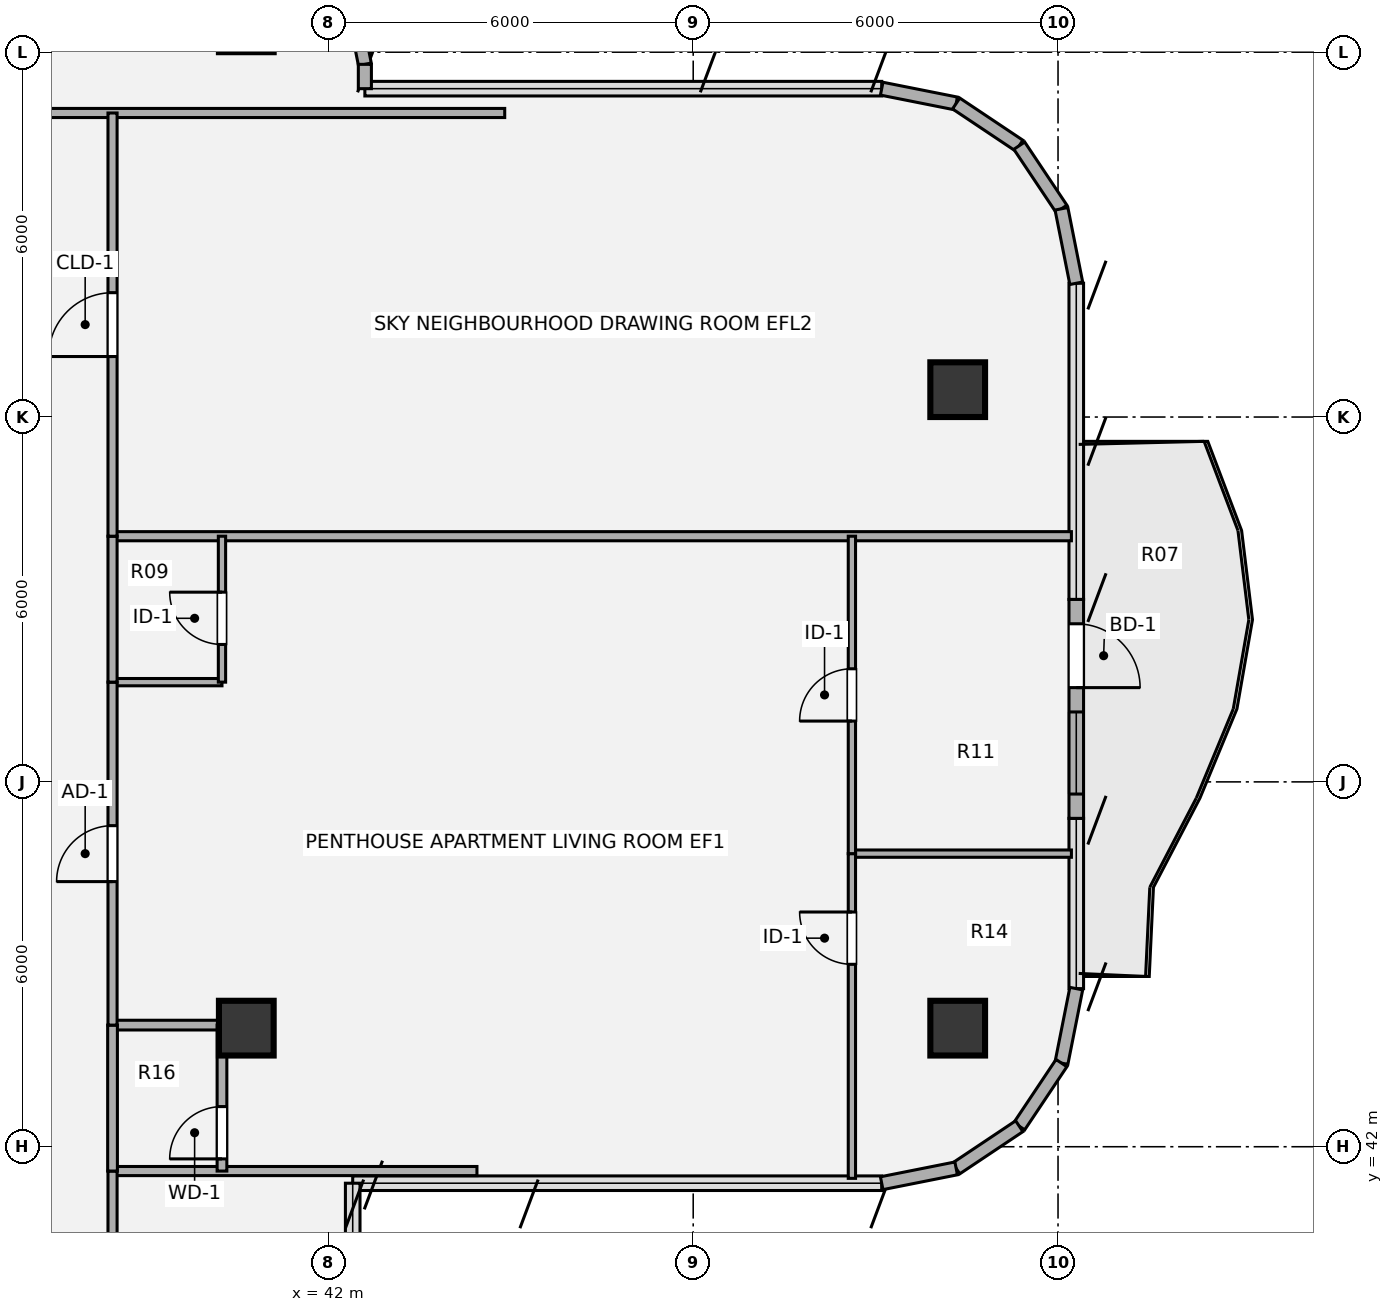
"""IFC4 building model, lengths in metres.
Left out: names, types, materials, properties, quantities, classifications, styles, units other than length and angle.
Written with IfcOpenShell. Run it as: python <this file> out.ifc"""

import sys

from ifc_helpers import new_model, si_unit, direction, frame, frame_2d, origin, origin_2d, place, context, subcontext, project, spatial, rectangle, hollow_circle, extrude, source, transform, mapped, element, fill, save


model = new_model("IFC4")
c1 = context("Model", 3, precision=1e-05, world=origin(), true_north=direction((0.0, 1.0)))
c2 = subcontext(c1, "Body", "Model", "MODEL_VIEW")
j1 = project(units=[si_unit("LENGTHUNIT", "METRE"), si_unit("PLANEANGLEUNIT", "RADIAN")], contexts=[c1])
p1 = place(None, origin())
s1 = spatial("IfcSite", under=j1, at=p1, CompositionType="ELEMENT")
p2 = place(p1, origin())
s2 = spatial("IfcBuilding", under=s1, at=p2, CompositionType="ELEMENT")
p3 = place(p2, frame((0.0, 0.0, 272.16)))
s3 = spatial("IfcBuildingStorey", under=s2, at=p3, CompositionType="ELEMENT", Elevation=272.16)
m1 = source(origin(), c2, "Body", "SweptSolid", [
    extrude(hollow_circle(Radius=0.45, WallThickness=0.032, at=origin_2d()), origin(), (0.0, 0.0, 1.0), 3.78),
])
for number, where, z_axis, x_axis in (
    (1, (52.35, 43.95, 0.0), (0.0, 0.0, 1.0), (1.0, 0.0, 0.0)),
    (2, (52.35, 54.45, 0.0), (0.0, 0.0, 1.0), (1.0, 0.0, 0.0)),
    (3, (40.65, 43.95, 0.0), (0.0, 0.0, 1.0), (1.0, 0.0, 0.0)),
):
    element("IfcColumn", number, at=place(p3, frame(where, z_axis=z_axis, x_axis=x_axis)), inside=s3, PredefinedType="COLUMN", context=c2, shape_type="MappedRepresentation", body=[
        mapped(m1, transform((0.0, 0.0, 0.0), x_axis=(1.0, 0.0, 0.0), y_axis=(0.0, 1.0, 0.0), z_axis=(0.0, 0.0, 1.0), scale=1.0)),
    ])
p4 = place(p3, frame((42.402, 60.795, 0.0), z_axis=(0.0, 0.0, 1.0), x_axis=(0.195190360752, -0.980765376158, 0.0)))
e4 = element("IfcWall", 4, at=p4, inside=s3, PredefinedType="SOLIDWALL", context=c2, shape_type="SweptSolid", body=[
    extrude(rectangle(XDim=1.014, YDim=0.215, at=frame_2d((0.507, 0.0))), origin(), (0.0, 0.0, 1.0), 3.53),
])
p5 = place(p3, frame((42.6, 59.8, 0.0), z_axis=(0.0, 0.0, 1.0), x_axis=(0.0, -1.0, 0.0)))
e5 = element("IfcWall", 5, at=p5, inside=s3, PredefinedType="SOLIDWALL", context=c2, shape_type="SweptSolid", body=[
    extrude(rectangle(XDim=0.4, YDim=0.215, at=frame_2d((0.2, 0.0))), origin(), (0.0, 0.0, 1.0), 3.53),
])
for number, where, z_axis, x_axis in (
    (6, (51.1, 59.4, 0.0), (0.0, 0.0, 1.0), (0.981, -0.195, 0.0)),
    (7, (52.325, 59.156, 0.0), (0.0, 0.0, 1.0), (0.831, -0.556, 0.0)),
    (8, (53.363, 58.463, 0.0), (0.0, 0.0, 1.0), (0.556, -0.831, 0.0)),
    (9, (54.056, 57.425, 0.0), (0.0, 0.0, 1.0), (0.195, -0.981, 0.0)),
):
    element("IfcWall", number, at=place(p3, frame(where, z_axis=z_axis, x_axis=x_axis)), inside=s3, PredefinedType="SOLIDWALL", context=c2, shape_type="SweptSolid", body=[
        extrude(rectangle(XDim=1.249, YDim=0.215, at=frame_2d((0.624, 0.0))), origin(), (0.0, 0.0, 1.0), 3.53),
    ])
p6 = place(p3, frame((54.3, 51.0, 0.0), z_axis=(0.0, 0.0, 1.0), x_axis=(0.0, -1.0, 0.0)))
e10 = element("IfcWall", 10, at=p6, inside=s3, PredefinedType="SOLIDWALL", context=c2, shape_type="SweptSolid", body=[
    extrude(rectangle(XDim=3.6, YDim=0.24, at=frame_2d((1.8, 0.0))), origin(), (0.0, 0.0, 1.0), 3.53),
])
p7 = place(p6, frame((0.4, 0.0, 0.0)))
e11 = element("IfcOpeningElement", 11, at=p7, cuts=e10, PredefinedType="OPENING", context=c2, shape_type="SweptSolid", body=[
    extrude(rectangle(XDim=1.05, YDim=2.15, at=origin_2d()), frame((0.525, 0.13, 1.075), z_axis=(0.0, -1.0, 0.0), x_axis=(1.0, 0.0, 0.0)), (0.0, 0.0, 1.0), 0.26),
])
p8 = place(p6, frame((1.85, 0.0, 0.85)))
e12 = element("IfcOpeningElement", 12, at=p8, cuts=e10, PredefinedType="OPENING", context=c2, shape_type="SweptSolid", body=[
    extrude(rectangle(XDim=1.35, YDim=1.35, at=origin_2d()), frame((0.675, 0.13, 0.675), z_axis=(0.0, -1.0, 0.0), x_axis=(1.0, 0.0, 0.0)), (0.0, 0.0, 1.0), 0.26),
])
for number, where, z_axis, x_axis in (
    (13, (54.3, 44.6, 0.0), (0.0, 0.0, 1.0), (-0.195, -0.981, 0.0)),
    (14, (54.056, 43.375, 0.0), (0.0, 0.0, 1.0), (-0.556, -0.831, 0.0)),
    (15, (53.363, 42.337, 0.0), (0.0, 0.0, 1.0), (-0.831, -0.556, 0.0)),
    (16, (52.325, 41.644, 0.0), (0.0, 0.0, 1.0), (-0.981, -0.195, 0.0)),
):
    element("IfcWall", number, at=place(p3, frame(where, z_axis=z_axis, x_axis=x_axis)), inside=s3, PredefinedType="SOLIDWALL", context=c2, shape_type="SweptSolid", body=[
        extrude(rectangle(XDim=1.249, YDim=0.215, at=frame_2d((0.624, 0.0))), origin(), (0.0, 0.0, 1.0), 3.53),
    ])
p9 = place(p3, frame((38.45, 41.6, 0.0), z_axis=(0.0, 0.0, 1.0), x_axis=(1.0, 0.0, 0.0)))
e17 = element("IfcWall", 17, at=p9, inside=s3, PredefinedType="PARTITIONING", context=c2, shape_type="SweptSolid", body=[
    extrude(rectangle(XDim=5.993, YDim=0.15, at=frame_2d((2.997, 0.0))), origin(), (0.0, 0.0, 1.0), 3.5),
])
p10 = place(p3, frame((38.45, 44.0, 0.0), z_axis=(0.0, 0.0, 1.0), x_axis=(1.0, 0.0, 0.0)))
e18 = element("IfcWall", 18, at=p10, inside=s3, PredefinedType="PLUMBINGWALL", context=c2, shape_type="SweptSolid", body=[
    extrude(rectangle(XDim=1.8, YDim=0.16, at=frame_2d((0.9, 0.0))), origin(), (0.0, 0.0, 1.0), 2.903),
])
p11 = place(p3, frame((50.61, 46.82, 0.0), z_axis=(0.0, 0.0, 1.0), x_axis=(1.0, 0.0, 0.0)))
e19 = element("IfcWall", 19, at=p11, inside=s3, PredefinedType="PARTITIONING", context=c2, shape_type="SweptSolid", body=[
    extrude(rectangle(XDim=3.61, YDim=0.12, at=frame_2d((1.805, 0.0))), origin(), (0.0, 0.0, 1.0), 2.982),
])
p12 = place(p3, frame((38.45, 49.64, 0.0), z_axis=(0.0, 0.0, 1.0), x_axis=(1.0, 0.0, 0.0)))
e20 = element("IfcWall", 20, at=p12, inside=s3, PredefinedType="PARTITIONING", context=c2, shape_type="SweptSolid", body=[
    extrude(rectangle(XDim=1.8, YDim=0.12, at=frame_2d((0.9, 0.0))), origin(), (0.0, 0.0, 1.0), 3.259),
])
p13 = place(p3, frame((38.45, 52.04, 0.0), z_axis=(0.0, 0.0, 1.0), x_axis=(1.0, 0.0, 0.0)))
e21 = element("IfcWall", 21, at=p13, inside=s3, PredefinedType="PARTITIONING", context=c2, shape_type="SweptSolid", body=[
    extrude(rectangle(XDim=15.77, YDim=0.15, at=frame_2d((7.885, 0.0))), origin(), (0.0, 0.0, 1.0), 2.982),
])
p14 = place(p3, frame((27.1, 59.0, 0.0), z_axis=(0.0, 0.0, 1.0), x_axis=(1.0, 0.0, 0.0)))
e22 = element("IfcWall", 22, at=p14, inside=s3, PredefinedType="PARTITIONING", context=c2, shape_type="SweptSolid", body=[
    extrude(rectangle(XDim=17.8, YDim=0.15, at=frame_2d((8.9, 0.0))), origin(), (0.0, 0.0, 1.0), 3.308),
])
p15 = place(p14, frame((8.375, 0.0, 0.0)))
e23 = element("IfcOpeningElement", 23, at=p15, cuts=e22, PredefinedType="OPENING", context=c2, shape_type="SweptSolid", body=[
    extrude(rectangle(XDim=1.05, YDim=2.1, at=origin_2d()), frame((0.525, 0.085, 1.05), z_axis=(0.0, -1.0, 0.0), x_axis=(1.0, 0.0, 0.0)), (0.0, 0.0, 1.0), 0.17),
])
p16 = place(p3, frame((38.45, 21.2, 0.0), z_axis=(0.0, 0.0, 1.0), x_axis=(0.0, 1.0, 0.0)))
e24 = element("IfcWall", 24, at=p16, inside=s3, PredefinedType="PARTITIONING", context=c2, shape_type="SweptSolid", body=[
    extrude(rectangle(XDim=20.4, YDim=0.15, at=frame_2d((10.2, 0.0))), origin(), (0.0, 0.0, 1.0), 3.5),
])
p17 = place(p16, frame((9.575, 0.0, 0.0)))
e25 = element("IfcOpeningElement", 25, at=p17, cuts=e24, PredefinedType="OPENING", context=c2, shape_type="SweptSolid", body=[
    extrude(rectangle(XDim=1.05, YDim=2.1, at=origin_2d()), frame((0.525, 0.085, 1.05), z_axis=(0.0, -1.0, 0.0), x_axis=(1.0, 0.0, 0.0)), (0.0, 0.0, 1.0), 0.17),
])
p18 = place(p3, frame((38.45, 41.6, 0.0), z_axis=(0.0, 0.0, 1.0), x_axis=(0.0, 1.0, 0.0)))
e26 = element("IfcWall", 26, at=p18, inside=s3, PredefinedType="PLUMBINGWALL", context=c2, shape_type="SweptSolid", body=[
    extrude(rectangle(XDim=2.4, YDim=0.16, at=frame_2d((1.2, 0.0))), origin(), (0.0, 0.0, 1.0), 3.5),
])
p19 = place(p3, frame((38.45, 44.0, 0.0), z_axis=(0.0, 0.0, 1.0), x_axis=(0.0, 1.0, 0.0)))
e27 = element("IfcWall", 27, at=p19, inside=s3, PredefinedType="PARTITIONING", context=c2, shape_type="SweptSolid", body=[
    extrude(rectangle(XDim=5.64, YDim=0.15, at=frame_2d((2.82, 0.0))), origin(), (0.0, 0.0, 1.0), 3.5),
])
p20 = place(p19, frame((2.36, 0.0, 0.0)))
e28 = element("IfcOpeningElement", 28, at=p20, cuts=e27, PredefinedType="OPENING", context=c2, shape_type="SweptSolid", body=[
    extrude(rectangle(XDim=0.92, YDim=2.1, at=origin_2d()), frame((0.46, 0.085, 1.05), z_axis=(0.0, -1.0, 0.0), x_axis=(1.0, 0.0, 0.0)), (0.0, 0.0, 1.0), 0.17),
])
p21 = place(p3, frame((38.45, 49.64, 0.0), z_axis=(0.0, 0.0, 1.0), x_axis=(0.0, 1.0, 0.0)))
e29 = element("IfcWall", 29, at=p21, inside=s3, PredefinedType="PARTITIONING", context=c2, shape_type="SweptSolid", body=[
    extrude(rectangle(XDim=2.4, YDim=0.15, at=frame_2d((1.2, 0.0))), origin(), (0.0, 0.0, 1.0), 3.5),
])
p22 = place(p3, frame((38.45, 52.04, 0.0), z_axis=(0.0, 0.0, 1.0), x_axis=(0.0, 1.0, 0.0)))
e30 = element("IfcWall", 30, at=p22, inside=s3, PredefinedType="PARTITIONING", context=c2, shape_type="SweptSolid", body=[
    extrude(rectangle(XDim=6.96, YDim=0.15, at=frame_2d((3.48, 0.0))), origin(), (0.0, 0.0, 1.0), 3.5),
])
p23 = place(p22, frame((2.955, 0.0, 0.0)))
e31 = element("IfcOpeningElement", 31, at=p23, cuts=e30, PredefinedType="OPENING", context=c2, shape_type="SweptSolid", body=[
    extrude(rectangle(XDim=1.05, YDim=2.1, at=origin_2d()), frame((0.525, 0.085, 1.05), z_axis=(0.0, -1.0, 0.0), x_axis=(1.0, 0.0, 0.0)), (0.0, 0.0, 1.0), 0.17),
])
p24 = place(p3, frame((40.25, 41.6, 0.0), z_axis=(0.0, 0.0, 1.0), x_axis=(0.0, 1.0, 0.0)))
e32 = element("IfcWall", 32, at=p24, inside=s3, PredefinedType="PLUMBINGWALL", context=c2, shape_type="SweptSolid", body=[
    extrude(rectangle(XDim=2.4, YDim=0.16, at=frame_2d((1.2, 0.0))), origin(), (0.0, 0.0, 1.0), 3.5),
])
p25 = place(p24, frame((0.2, 0.0, 0.0)))
e33 = element("IfcOpeningElement", 33, at=p25, cuts=e32, PredefinedType="OPENING", context=c2, shape_type="SweptSolid", body=[
    extrude(rectangle(XDim=0.86, YDim=2.1, at=origin_2d()), frame((0.43, 0.09, 1.05), z_axis=(0.0, -1.0, 0.0), x_axis=(1.0, 0.0, 0.0)), (0.0, 0.0, 1.0), 0.18),
])
p26 = place(p3, frame((40.25, 49.64, 0.0), z_axis=(0.0, 0.0, 1.0), x_axis=(0.0, 1.0, 0.0)))
e34 = element("IfcWall", 34, at=p26, inside=s3, PredefinedType="PARTITIONING", context=c2, shape_type="SweptSolid", body=[
    extrude(rectangle(XDim=2.4, YDim=0.12, at=frame_2d((1.2, 0.0))), origin(), (0.0, 0.0, 1.0), 3.5),
])
p27 = place(p26, frame((0.62, 0.0, 0.0)))
e35 = element("IfcOpeningElement", 35, at=p27, cuts=e34, PredefinedType="OPENING", context=c2, shape_type="SweptSolid", body=[
    extrude(rectangle(XDim=0.86, YDim=2.1, at=origin_2d()), frame((0.43, 0.07, 1.05), z_axis=(0.0, -1.0, 0.0), x_axis=(1.0, 0.0, 0.0)), (0.0, 0.0, 1.0), 0.14),
])
p28 = place(p3, frame((50.61, 41.48, 0.0), z_axis=(0.0, 0.0, 1.0), x_axis=(0.0, 1.0, 0.0)))
e36 = element("IfcWall", 36, at=p28, inside=s3, PredefinedType="PARTITIONING", context=c2, shape_type="SweptSolid", body=[
    extrude(rectangle(XDim=5.34, YDim=0.12, at=frame_2d((2.67, 0.0))), origin(), (0.0, 0.0, 1.0), 3.5),
])
p29 = place(p28, frame((3.52, 0.0, 0.0)))
e37 = element("IfcOpeningElement", 37, at=p29, cuts=e36, PredefinedType="OPENING", context=c2, shape_type="SweptSolid", body=[
    extrude(rectangle(XDim=0.86, YDim=2.1, at=origin_2d()), frame((0.43, 0.07, 1.05), z_axis=(0.0, -1.0, 0.0), x_axis=(1.0, 0.0, 0.0)), (0.0, 0.0, 1.0), 0.14),
])
p30 = place(p3, frame((50.61, 46.82, 0.0), z_axis=(0.0, 0.0, 1.0), x_axis=(0.0, 1.0, 0.0)))
e38 = element("IfcWall", 38, at=p30, inside=s3, PredefinedType="PARTITIONING", context=c2, shape_type="SweptSolid", body=[
    extrude(rectangle(XDim=5.22, YDim=0.12, at=frame_2d((2.61, 0.0))), origin(), (0.0, 0.0, 1.0), 3.5),
])
p31 = place(p30, frame((2.18, 0.0, 0.0)))
e39 = element("IfcOpeningElement", 39, at=p31, cuts=e38, PredefinedType="OPENING", context=c2, shape_type="SweptSolid", body=[
    extrude(rectangle(XDim=0.86, YDim=2.1, at=origin_2d()), frame((0.43, 0.07, 1.05), z_axis=(0.0, -1.0, 0.0), x_axis=(1.0, 0.0, 0.0)), (0.0, 0.0, 1.0), 0.14),
])
m2 = source(origin(), c2, "Body", "SweptSolid", [
    extrude(rectangle(XDim=1.05, YDim=2.15, at=origin_2d()), frame((0.525, 0.025, 1.075), z_axis=(0.0, -1.0, 0.0), x_axis=(1.0, 0.0, 0.0)), (0.0, 0.0, 1.0), 0.05),
])
p32 = place(p7, origin())
e40 = element("IfcDoor", 40, at=p32, inside=s3, OperationType="SINGLE_SWING_RIGHT", PredefinedType="DOOR", context=c2, shape_type="MappedRepresentation", body=[
    mapped(m2, transform((0.0, 0.0, 0.0), x_axis=(1.0, 0.0, 0.0), y_axis=(0.0, 1.0, 0.0), z_axis=(0.0, 0.0, 1.0), scale=1.0)),
])
fill(e11, e40)
m3 = source(origin(), c2, "Body", "SweptSolid", [
    extrude(rectangle(XDim=1.35, YDim=1.35, at=origin_2d()), frame((0.675, 0.03, 0.675), z_axis=(0.0, -1.0, 0.0), x_axis=(1.0, 0.0, 0.0)), (0.0, 0.0, 1.0), 0.06),
])
p33 = place(p8, origin())
e41 = element("IfcWindow", 41, at=p33, inside=s3, PartitioningType="SINGLE_PANEL", PredefinedType="WINDOW", context=c2, shape_type="MappedRepresentation", body=[
    mapped(m3, transform((0.0, 0.0, 0.0), x_axis=(1.0, 0.0, 0.0), y_axis=(0.0, 1.0, 0.0), z_axis=(0.0, 0.0, 1.0), scale=1.0)),
])
fill(e12, e41)
m4 = source(origin(), c2, "Body", "SweptSolid", [
    extrude(rectangle(XDim=0.92, YDim=2.1, at=origin_2d()), frame((0.46, 0.025, 1.05), z_axis=(0.0, -1.0, 0.0), x_axis=(1.0, 0.0, 0.0)), (0.0, 0.0, 1.0), 0.05),
])
p34 = place(p20, origin())
e42 = element("IfcDoor", 42, at=p34, inside=s3, OperationType="SINGLE_SWING_LEFT", PredefinedType="DOOR", context=c2, shape_type="MappedRepresentation", body=[
    mapped(m4, transform((0.0, 0.0, 0.0), x_axis=(1.0, 0.0, 0.0), y_axis=(0.0, 1.0, 0.0), z_axis=(0.0, 0.0, 1.0), scale=1.0)),
])
fill(e28, e42)
m5 = source(origin(), c2, "Body", "SweptSolid", [
    extrude(rectangle(XDim=1.05, YDim=2.1, at=origin_2d()), frame((0.525, 0.025, 1.05), z_axis=(0.0, -1.0, 0.0), x_axis=(1.0, 0.0, 0.0)), (0.0, 0.0, 1.0), 0.05),
])
p35 = place(p23, origin())
e43 = element("IfcDoor", 43, at=p35, inside=s3, OperationType="SINGLE_SWING_LEFT", PredefinedType="DOOR", context=c2, shape_type="MappedRepresentation", body=[
    mapped(m5, transform((0.0, 0.0, 0.0), x_axis=(1.0, 0.0, 0.0), y_axis=(0.0, 1.0, 0.0), z_axis=(0.0, 0.0, 1.0), scale=1.0)),
])
fill(e31, e43)
m6 = source(origin(), c2, "Body", "SweptSolid", [
    extrude(rectangle(XDim=0.86, YDim=2.1, at=origin_2d()), frame((0.43, 0.025, 1.05), z_axis=(0.0, -1.0, 0.0), x_axis=(1.0, 0.0, 0.0)), (0.0, 0.0, 1.0), 0.05),
])
p36 = place(p25, origin())
e44 = element("IfcDoor", 44, at=p36, inside=s3, OperationType="SINGLE_SWING_LEFT", PredefinedType="DOOR", context=c2, shape_type="MappedRepresentation", body=[
    mapped(m6, transform((0.0, 0.0, 0.0), x_axis=(1.0, 0.0, 0.0), y_axis=(0.0, 1.0, 0.0), z_axis=(0.0, 0.0, 1.0), scale=1.0)),
])
fill(e33, e44)
m7 = source(origin(), c2, "Body", "SweptSolid", [
    extrude(rectangle(XDim=0.86, YDim=2.1, at=origin_2d()), frame((0.43, 0.025, 1.05), z_axis=(0.0, -1.0, 0.0), x_axis=(1.0, 0.0, 0.0)), (0.0, 0.0, 1.0), 0.05),
])
p37 = place(p27, origin())
e45 = element("IfcDoor", 45, at=p37, inside=s3, OperationType="SINGLE_SWING_RIGHT", PredefinedType="DOOR", context=c2, shape_type="MappedRepresentation", body=[
    mapped(m7, transform((0.0, 0.0, 0.0), x_axis=(1.0, 0.0, 0.0), y_axis=(0.0, 1.0, 0.0), z_axis=(0.0, 0.0, 1.0), scale=1.0)),
])
fill(e35, e45)
p38 = place(p29, origin())
e46 = element("IfcDoor", 46, at=p38, inside=s3, OperationType="SINGLE_SWING_RIGHT", PredefinedType="DOOR", context=c2, shape_type="MappedRepresentation", body=[
    mapped(m7, transform((0.0, 0.0, 0.0), x_axis=(1.0, 0.0, 0.0), y_axis=(0.0, 1.0, 0.0), z_axis=(0.0, 0.0, 1.0), scale=1.0)),
])
fill(e37, e46)
p39 = place(p31, origin())
e47 = element("IfcDoor", 47, at=p39, inside=s3, OperationType="SINGLE_SWING_LEFT", PredefinedType="DOOR", context=c2, shape_type="MappedRepresentation", body=[
    mapped(m7, transform((0.0, 0.0, 0.0), x_axis=(1.0, 0.0, 0.0), y_axis=(0.0, 1.0, 0.0), z_axis=(0.0, 0.0, 1.0), scale=1.0)),
])
fill(e39, e47)
save(model, sys.argv[1])
